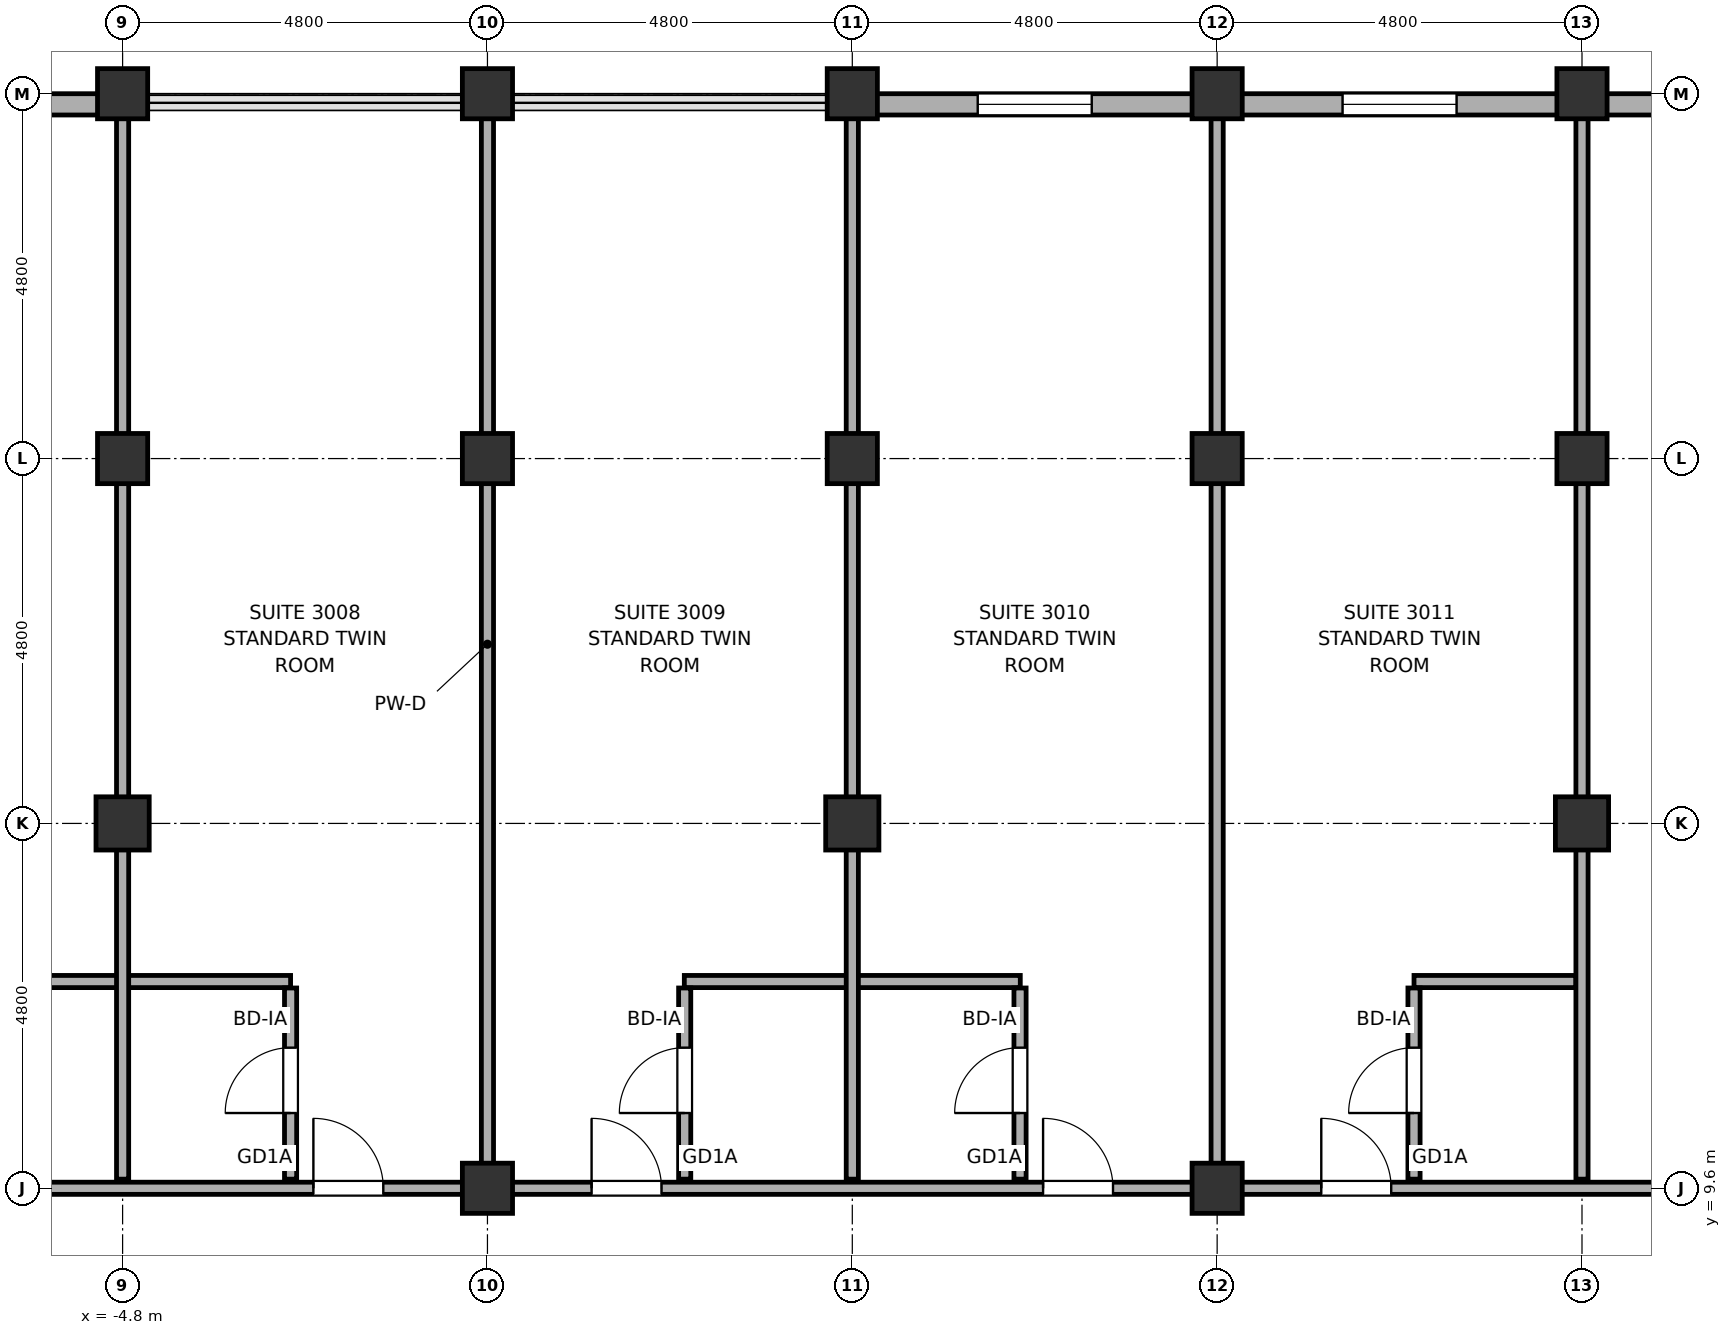
"""IFC4 building model, lengths in metres.
Left out: names, types, materials, properties, quantities, classifications, styles, units other than length and angle.
Written with IfcOpenShell. Run it as: python <this file> out.ifc"""

import sys

from ifc_helpers import new_model, si_unit, direction, frame, frame_2d, origin, origin_2d, place, context, subcontext, project, spatial, rectangle, hollow_rectangle, hollow_circle, extrude, element, fill, save


model = new_model("IFC4")
c1 = context("Model", 3, precision=1e-05, world=origin(), true_north=direction((0.0, 1.0)))
c2 = subcontext(c1, "Body", "Model", "MODEL_VIEW")
j1 = project(units=[si_unit("LENGTHUNIT", "METRE"), si_unit("PLANEANGLEUNIT", "RADIAN")], contexts=[c1])
p1 = place(None, origin())
s1 = spatial("IfcSite", under=j1, at=p1, CompositionType="ELEMENT")
p2 = place(p1, origin())
s2 = spatial("IfcBuilding", under=s1, at=p2, CompositionType="ELEMENT")
p3 = place(p2, frame((0.0, 0.0, 124.8)))
s3 = spatial("IfcBuildingStorey", under=s2, at=p3, CompositionType="ELEMENT", Elevation=124.8)
p4 = place(p3, frame((-4.8, 14.4, 0.0), z_axis=(0.0, 0.0, 1.0), x_axis=(1.0, 0.0, 0.0)))
e1 = element("IfcColumn", 1, at=p4, inside=s3, PredefinedType="COLUMN", context=c2, shape_type="SweptSolid", body=[
    extrude(hollow_rectangle(XDim=0.7, YDim=0.7, WallThickness=0.032, at=origin_2d()), origin(), (0.0, 0.0, 1.0), 3.7),
])
for number, where, z_axis, x_axis in (
    (2, (-4.8, 19.2, 0.0), (0.0, 0.0, 1.0), (1.0, 0.0, 0.0)),
    (3, (-4.8, 24.0, 0.0), (0.0, 0.0, 1.0), (1.0, 0.0, 0.0)),
    (4, (0.0, 9.6, 0.0), (0.0, 0.0, 1.0), (1.0, 0.0, 0.0)),
    (5, (0.0, 19.2, 0.0), (0.0, 0.0, 1.0), (1.0, 0.0, 0.0)),
    (6, (0.0, 24.0, 0.0), (0.0, 0.0, 1.0), (1.0, 0.0, 0.0)),
):
    element("IfcColumn", number, at=place(p3, frame(where, z_axis=z_axis, x_axis=x_axis)), inside=s3, PredefinedType="COLUMN", context=c2, shape_type="SweptSolid", body=[
        extrude(hollow_circle(Radius=0.33, WallThickness=0.028, at=origin_2d()), origin(), (0.0, 0.0, 1.0), 3.7),
    ])
p5 = place(p3, frame((4.8, 14.4, 0.0), z_axis=(0.0, 0.0, 1.0), x_axis=(1.0, 0.0, 0.0)))
e7 = element("IfcColumn", 7, at=p5, inside=s3, PredefinedType="COLUMN", context=c2, shape_type="SweptSolid", body=[
    extrude(hollow_rectangle(XDim=0.7, YDim=0.7, WallThickness=0.032, at=origin_2d()), origin(), (0.0, 0.0, 1.0), 3.7),
])
for number, where, z_axis, x_axis in (
    (8, (4.8, 19.2, 0.0), (0.0, 0.0, 1.0), (1.0, 0.0, 0.0)),
    (9, (4.8, 24.0, 0.0), (0.0, 0.0, 1.0), (1.0, 0.0, 0.0)),
    (10, (9.6, 9.6, 0.0), (0.0, 0.0, 1.0), (1.0, 0.0, 0.0)),
    (11, (9.6, 19.2, 0.0), (0.0, 0.0, 1.0), (1.0, 0.0, 0.0)),
    (12, (9.6, 24.0, 0.0), (0.0, 0.0, 1.0), (1.0, 0.0, 0.0)),
):
    element("IfcColumn", number, at=place(p3, frame(where, z_axis=z_axis, x_axis=x_axis)), inside=s3, PredefinedType="COLUMN", context=c2, shape_type="SweptSolid", body=[
        extrude(hollow_circle(Radius=0.33, WallThickness=0.028, at=origin_2d()), origin(), (0.0, 0.0, 1.0), 3.7),
    ])
p6 = place(p3, frame((14.4, 14.4, 0.0), z_axis=(0.0, 0.0, 1.0), x_axis=(1.0, 0.0, 0.0)))
e13 = element("IfcColumn", 13, at=p6, inside=s3, PredefinedType="COLUMN", context=c2, shape_type="SweptSolid", body=[
    extrude(hollow_rectangle(XDim=0.7, YDim=0.7, WallThickness=0.032, at=origin_2d()), origin(), (0.0, 0.0, 1.0), 3.7),
])
for number, where, z_axis, x_axis in (
    (14, (14.4, 19.2, 0.0), (0.0, 0.0, 1.0), (1.0, 0.0, 0.0)),
    (15, (14.4, 24.0, 0.0), (0.0, 0.0, 1.0), (1.0, 0.0, 0.0)),
):
    element("IfcColumn", number, at=place(p3, frame(where, z_axis=z_axis, x_axis=x_axis)), inside=s3, PredefinedType="COLUMN", context=c2, shape_type="SweptSolid", body=[
        extrude(hollow_circle(Radius=0.33, WallThickness=0.028, at=origin_2d()), origin(), (0.0, 0.0, 1.0), 3.7),
    ])
p7 = place(p3, frame((-30.0, 23.86, 0.0), z_axis=(0.0, 0.0, 1.0), x_axis=(1.0, 0.0, 0.0)))
e16 = element("IfcWall", 16, at=p7, inside=s3, PredefinedType="SOLIDWALL", context=c2, shape_type="SweptSolid", body=[
    extrude(rectangle(XDim=25.25, YDim=0.28, at=frame_2d((12.625, 0.0))), origin(), (0.0, 0.0, 1.0), 2.12),
])
p8 = place(p7, frame((7.65, 0.0, 0.75)))
e17 = element("IfcOpeningElement", 17, at=p8, cuts=e16, PredefinedType="OPENING", context=c2, shape_type="SweptSolid", body=[
    extrude(rectangle(XDim=1.5, YDim=1.15, at=frame_2d((0.75, 0.575))), frame((0.0, 0.155, 0.0), z_axis=(0.0, -1.0, 0.0), x_axis=(1.0, 0.0, 0.0)), (0.0, 0.0, 1.0), 0.31),
])
p9 = place(p7, frame((18.6, 0.0, 0.75)))
e18 = element("IfcOpeningElement", 18, at=p9, cuts=e16, PredefinedType="OPENING", context=c2, shape_type="SweptSolid", body=[
    extrude(rectangle(XDim=1.2, YDim=1.15, at=frame_2d((0.6, 0.575))), frame((0.0, 0.155, 0.0), z_axis=(0.0, -1.0, 0.0), x_axis=(1.0, 0.0, 0.0)), (0.0, 0.0, 1.0), 0.31),
])
p10 = place(p7, frame((22.05, 0.0, 0.75)))
e19 = element("IfcOpeningElement", 19, at=p10, cuts=e16, PredefinedType="OPENING", context=c2, shape_type="SweptSolid", body=[
    extrude(rectangle(XDim=1.5, YDim=1.15, at=frame_2d((0.75, 0.575))), frame((0.0, 0.155, 0.0), z_axis=(0.0, -1.0, 0.0), x_axis=(1.0, 0.0, 0.0)), (0.0, 0.0, 1.0), 0.31),
])
p11 = place(p3, frame((4.75, 23.86, 0.0), z_axis=(0.0, 0.0, 1.0), x_axis=(1.0, 0.0, 0.0)))
e20 = element("IfcWall", 20, at=p11, inside=s3, PredefinedType="SOLIDWALL", context=c2, shape_type="SweptSolid", body=[
    extrude(rectangle(XDim=20.45, YDim=0.28, at=frame_2d((10.225, 0.0))), origin(), (0.0, 0.0, 1.0), 2.12),
])
p12 = place(p11, frame((11.817, 0.0, 0.75)))
e21 = element("IfcOpeningElement", 21, at=p12, cuts=e20, PredefinedType="OPENING", context=c2, shape_type="SweptSolid", body=[
    extrude(rectangle(XDim=1.5, YDim=1.15, at=frame_2d((0.75, 0.575))), frame((0.0, 0.155, 0.0), z_axis=(0.0, -1.0, 0.0), x_axis=(1.0, 0.0, 0.0)), (0.0, 0.0, 1.0), 0.31),
])
p13 = place(p11, frame((1.7, 0.0, 0.75)))
e22 = element("IfcOpeningElement", 22, at=p13, cuts=e20, PredefinedType="OPENING", context=c2, shape_type="SweptSolid", body=[
    extrude(rectangle(XDim=1.5, YDim=1.15, at=frame_2d((0.75, 0.575))), frame((0.0, 0.155, 0.0), z_axis=(0.0, -1.0, 0.0), x_axis=(1.0, 0.0, 0.0)), (0.0, 0.0, 1.0), 0.31),
])
p14 = place(p11, frame((6.5, 0.0, 0.75)))
e23 = element("IfcOpeningElement", 23, at=p14, cuts=e20, PredefinedType="OPENING", context=c2, shape_type="SweptSolid", body=[
    extrude(rectangle(XDim=1.5, YDim=1.15, at=frame_2d((0.75, 0.575))), frame((0.0, 0.155, 0.0), z_axis=(0.0, -1.0, 0.0), x_axis=(1.0, 0.0, 0.0)), (0.0, 0.0, 1.0), 0.31),
])
p15 = place(p3, frame((-14.32, 9.6, 0.0), z_axis=(0.0, 0.0, 1.0), x_axis=(1.0, 0.0, 0.0)))
e24 = element("IfcWall", 24, at=p15, inside=s3, PredefinedType="PARTITIONING", context=c2, shape_type="SweptSolid", body=[
    extrude(rectangle(XDim=42.95, YDim=0.16, at=frame_2d((21.475, 0.0))), origin(), (0.0, 0.0, 1.0), 2.12),
])
p16 = place(p15, frame((35.47, 0.0, 0.0)))
e25 = element("IfcOpeningElement", 25, at=p16, cuts=e24, PredefinedType="OPENING", context=c2, shape_type="SweptSolid", body=[
    extrude(rectangle(XDim=0.9, YDim=2.02, at=frame_2d((0.45, 1.01))), frame((0.0, 0.095, 0.0), z_axis=(0.0, -1.0, 0.0), x_axis=(1.0, 0.0, 0.0)), (0.0, 0.0, 1.0), 0.19),
])
p17 = place(p15, frame((0.67, 0.0, 0.0)))
e26 = element("IfcOpeningElement", 26, at=p17, cuts=e24, PredefinedType="OPENING", context=c2, shape_type="SweptSolid", body=[
    extrude(rectangle(XDim=0.9, YDim=2.02, at=frame_2d((0.45, 1.01))), frame((0.0, 0.095, 0.0), z_axis=(0.0, -1.0, 0.0), x_axis=(1.0, 0.0, 0.0)), (0.0, 0.0, 1.0), 0.19),
])
p18 = place(p15, frame((2.56, 0.0, 0.0)))
e27 = element("IfcOpeningElement", 27, at=p18, cuts=e24, PredefinedType="OPENING", context=c2, shape_type="SweptSolid", body=[
    extrude(rectangle(XDim=0.9, YDim=2.02, at=frame_2d((0.45, 1.01))), frame((0.0, 0.095, 0.0), z_axis=(0.0, -1.0, 0.0), x_axis=(1.0, 0.0, 0.0)), (0.0, 0.0, 1.0), 0.19),
])
p19 = place(p15, frame((6.09, 0.0, 0.0)))
e28 = element("IfcOpeningElement", 28, at=p19, cuts=e24, PredefinedType="OPENING", context=c2, shape_type="SweptSolid", body=[
    extrude(rectangle(XDim=0.92, YDim=2.02, at=frame_2d((0.46, 1.01))), frame((0.0, 0.095, 0.0), z_axis=(0.0, -1.0, 0.0), x_axis=(1.0, 0.0, 0.0)), (0.0, 0.0, 1.0), 0.19),
])
p20 = place(p15, frame((12.03, 0.0, 0.0)))
e29 = element("IfcOpeningElement", 29, at=p20, cuts=e24, PredefinedType="OPENING", context=c2, shape_type="SweptSolid", body=[
    extrude(rectangle(XDim=0.92, YDim=2.02, at=frame_2d((0.46, 1.01))), frame((0.0, 0.095, 0.0), z_axis=(0.0, -1.0, 0.0), x_axis=(1.0, 0.0, 0.0)), (0.0, 0.0, 1.0), 0.19),
])
p21 = place(p15, frame((15.69, 0.0, 0.0)))
e30 = element("IfcOpeningElement", 30, at=p21, cuts=e24, PredefinedType="OPENING", context=c2, shape_type="SweptSolid", body=[
    extrude(rectangle(XDim=0.92, YDim=2.02, at=frame_2d((0.46, 1.01))), frame((0.0, 0.095, 0.0), z_axis=(0.0, -1.0, 0.0), x_axis=(1.0, 0.0, 0.0)), (0.0, 0.0, 1.0), 0.19),
])
p22 = place(p15, frame((21.63, 0.0, 0.0)))
e31 = element("IfcOpeningElement", 31, at=p22, cuts=e24, PredefinedType="OPENING", context=c2, shape_type="SweptSolid", body=[
    extrude(rectangle(XDim=0.92, YDim=2.02, at=frame_2d((0.46, 1.01))), frame((0.0, 0.095, 0.0), z_axis=(0.0, -1.0, 0.0), x_axis=(1.0, 0.0, 0.0)), (0.0, 0.0, 1.0), 0.19),
])
p23 = place(p15, frame((25.29, 0.0, 0.0)))
e32 = element("IfcOpeningElement", 32, at=p23, cuts=e24, PredefinedType="OPENING", context=c2, shape_type="SweptSolid", body=[
    extrude(rectangle(XDim=0.92, YDim=2.02, at=frame_2d((0.46, 1.01))), frame((0.0, 0.095, 0.0), z_axis=(0.0, -1.0, 0.0), x_axis=(1.0, 0.0, 0.0)), (0.0, 0.0, 1.0), 0.19),
])
for number, where, z_axis, x_axis in (
    (33, (-7.01, 12.32, 0.0), (0.0, 0.0, 1.0), (1.0, 0.0, 0.0)),
    (34, (2.59, 12.32, 0.0), (0.0, 0.0, 1.0), (1.0, 0.0, 0.0)),
):
    element("IfcWall", number, at=place(p3, frame(where, z_axis=z_axis, x_axis=x_axis)), inside=s3, PredefinedType="PARTITIONING", context=c2, shape_type="SweptSolid", body=[
        extrude(rectangle(XDim=4.42, YDim=0.16, at=frame_2d((2.21, 0.0))), origin(), (0.0, 0.0, 1.0), 2.87),
    ])
p24 = place(p3, frame((12.19, 12.32, 0.0), z_axis=(0.0, 0.0, 1.0), x_axis=(1.0, 0.0, 0.0)))
e35 = element("IfcWall", 35, at=p24, inside=s3, PredefinedType="PARTITIONING", context=c2, shape_type="SweptSolid", body=[
    extrude(rectangle(XDim=2.13, YDim=0.16, at=frame_2d((1.065, 0.0))), origin(), (0.0, 0.0, 1.0), 2.87),
])
p25 = place(p3, frame((-4.8, 9.72, 0.0), z_axis=(0.0, 0.0, 1.0), x_axis=(0.0, 1.0, 0.0)))
e36 = element("IfcWall", 36, at=p25, inside=s3, PredefinedType="PARTITIONING", context=c2, shape_type="SweptSolid", body=[
    extrude(rectangle(XDim=13.99, YDim=0.16, at=frame_2d((6.995, 0.0))), origin(), (0.0, 0.0, 1.0), 2.12),
])
p26 = place(p3, frame((-2.59, 9.72, 0.0), z_axis=(0.0, 0.0, 1.0), x_axis=(0.0, 1.0, 0.0)))
e37 = element("IfcWall", 37, at=p26, inside=s3, PredefinedType="PARTITIONING", context=c2, shape_type="SweptSolid", body=[
    extrude(rectangle(XDim=2.515, YDim=0.16, at=frame_2d((1.258, 0.0))), origin(), (0.0, 0.0, 1.0), 2.12),
])
p27 = place(p26, frame((0.87, 0.0, 0.0)))
e38 = element("IfcOpeningElement", 38, at=p27, cuts=e37, PredefinedType="OPENING", context=c2, shape_type="SweptSolid", body=[
    extrude(rectangle(XDim=0.86, YDim=2.02, at=frame_2d((0.43, 1.01))), frame((0.0, 0.095, 0.0), z_axis=(0.0, -1.0, 0.0), x_axis=(1.0, 0.0, 0.0)), (0.0, 0.0, 1.0), 0.19),
])
p28 = place(p3, frame((0.0, 9.72, 0.0), z_axis=(0.0, 0.0, 1.0), x_axis=(0.0, 1.0, 0.0)))
e39 = element("IfcWall", 39, at=p28, inside=s3, PredefinedType="PARTITIONING", context=c2, shape_type="SweptSolid", body=[
    extrude(rectangle(XDim=14.075, YDim=0.16, at=frame_2d((7.038, 0.0))), origin(), (0.0, 0.0, 1.0), 2.12),
])
p29 = place(p3, frame((2.595, 9.72, 0.0), z_axis=(0.0, 0.0, 1.0), x_axis=(0.0, 1.0, 0.0)))
e40 = element("IfcWall", 40, at=p29, inside=s3, PredefinedType="PARTITIONING", context=c2, shape_type="SweptSolid", body=[
    extrude(rectangle(XDim=2.515, YDim=0.16, at=frame_2d((1.258, 0.0))), origin(), (0.0, 0.0, 1.0), 2.12),
])
p30 = place(p29, frame((0.87, 0.0, 0.0)))
e41 = element("IfcOpeningElement", 41, at=p30, cuts=e40, PredefinedType="OPENING", context=c2, shape_type="SweptSolid", body=[
    extrude(rectangle(XDim=0.86, YDim=2.02, at=frame_2d((0.43, 1.01))), frame((0.0, 0.095, 0.0), z_axis=(0.0, -1.0, 0.0), x_axis=(1.0, 0.0, 0.0)), (0.0, 0.0, 1.0), 0.19),
])
p31 = place(p3, frame((4.8, 9.72, 0.0), z_axis=(0.0, 0.0, 1.0), x_axis=(0.0, 1.0, 0.0)))
e42 = element("IfcWall", 42, at=p31, inside=s3, PredefinedType="PARTITIONING", context=c2, shape_type="SweptSolid", body=[
    extrude(rectangle(XDim=13.99, YDim=0.16, at=frame_2d((6.995, 0.0))), origin(), (0.0, 0.0, 1.0), 2.12),
])
p32 = place(p3, frame((7.007, 9.72, 0.0), z_axis=(0.0, 0.0, 1.0), x_axis=(0.0, 1.0, 0.0)))
e43 = element("IfcWall", 43, at=p32, inside=s3, PredefinedType="PARTITIONING", context=c2, shape_type="SweptSolid", body=[
    extrude(rectangle(XDim=2.515, YDim=0.16, at=frame_2d((1.258, 0.0))), origin(), (0.0, 0.0, 1.0), 2.12),
])
p33 = place(p32, frame((0.87, 0.0, 0.0)))
e44 = element("IfcOpeningElement", 44, at=p33, cuts=e43, PredefinedType="OPENING", context=c2, shape_type="SweptSolid", body=[
    extrude(rectangle(XDim=0.86, YDim=2.02, at=frame_2d((0.43, 1.01))), frame((0.0, 0.095, 0.0), z_axis=(0.0, -1.0, 0.0), x_axis=(1.0, 0.0, 0.0)), (0.0, 0.0, 1.0), 0.19),
])
p34 = place(p3, frame((9.6, 9.72, 0.0), z_axis=(0.0, 0.0, 1.0), x_axis=(0.0, 1.0, 0.0)))
e45 = element("IfcWall", 45, at=p34, inside=s3, PredefinedType="PARTITIONING", context=c2, shape_type="SweptSolid", body=[
    extrude(rectangle(XDim=13.99, YDim=0.16, at=frame_2d((6.995, 0.0))), origin(), (0.0, 0.0, 1.0), 2.12),
])
p35 = place(p3, frame((12.19, 9.72, 0.0), z_axis=(0.0, 0.0, 1.0), x_axis=(0.0, 1.0, 0.0)))
e46 = element("IfcWall", 46, at=p35, inside=s3, PredefinedType="PARTITIONING", context=c2, shape_type="SweptSolid", body=[
    extrude(rectangle(XDim=2.515, YDim=0.16, at=frame_2d((1.258, 0.0))), origin(), (0.0, 0.0, 1.0), 2.12),
])
p36 = place(p35, frame((0.87, 0.0, 0.0)))
e47 = element("IfcOpeningElement", 47, at=p36, cuts=e46, PredefinedType="OPENING", context=c2, shape_type="SweptSolid", body=[
    extrude(rectangle(XDim=0.86, YDim=2.02, at=frame_2d((0.43, 1.01))), frame((0.0, 0.095, 0.0), z_axis=(0.0, -1.0, 0.0), x_axis=(1.0, 0.0, 0.0)), (0.0, 0.0, 1.0), 0.19),
])
p37 = place(p3, frame((14.4, 9.72, 0.0), z_axis=(0.0, 0.0, 1.0), x_axis=(0.0, 1.0, 0.0)))
e48 = element("IfcWall", 48, at=p37, inside=s3, PredefinedType="PARTITIONING", context=c2, shape_type="SweptSolid", body=[
    extrude(rectangle(XDim=13.99, YDim=0.16, at=frame_2d((6.995, 0.0))), origin(), (0.0, 0.0, 1.0), 2.12),
])
p38 = place(p13, origin())
e49 = element("IfcWindow", 49, at=p38, inside=s3, PartitioningType="SINGLE_PANEL", PredefinedType="WINDOW", context=c2, shape_type="SweptSolid", body=[
    extrude(rectangle(XDim=1.5, YDim=1.15, at=frame_2d((0.75, 0.575))), frame((0.0, 0.03, 0.0), z_axis=(0.0, -1.0, 0.0), x_axis=(1.0, 0.0, 0.0)), (0.0, 0.0, 1.0), 0.06),
])
fill(e22, e49)
p39 = place(p14, origin())
e50 = element("IfcWindow", 50, at=p39, inside=s3, PartitioningType="SINGLE_PANEL", PredefinedType="WINDOW", context=c2, shape_type="SweptSolid", body=[
    extrude(rectangle(XDim=1.5, YDim=1.15, at=frame_2d((0.75, 0.575))), frame((0.0, 0.03, 0.0), z_axis=(0.0, -1.0, 0.0), x_axis=(1.0, 0.0, 0.0)), (0.0, 0.0, 1.0), 0.06),
])
fill(e23, e50)
p40 = place(p20, origin())
e51 = element("IfcDoor", 51, at=p40, inside=s3, OperationType="SINGLE_SWING_RIGHT", PredefinedType="DOOR", context=c2, shape_type="SweptSolid", body=[
    extrude(rectangle(XDim=0.92, YDim=2.02, at=frame_2d((0.46, 1.01))), frame((0.0, 0.025, 0.0), z_axis=(0.0, -1.0, 0.0), x_axis=(1.0, 0.0, 0.0)), (0.0, 0.0, 1.0), 0.05),
])
fill(e29, e51)
p41 = place(p27, origin())
e52 = element("IfcDoor", 52, at=p41, inside=s3, OperationType="SINGLE_SWING_LEFT", PredefinedType="DOOR", context=c2, shape_type="SweptSolid", body=[
    extrude(rectangle(XDim=0.86, YDim=2.02, at=frame_2d((0.43, 1.01))), frame((0.0, 0.025, 0.0), z_axis=(0.0, -1.0, 0.0), x_axis=(1.0, 0.0, 0.0)), (0.0, 0.0, 1.0), 0.05),
])
fill(e38, e52)
p42 = place(p21, origin())
e53 = element("IfcDoor", 53, at=p42, inside=s3, OperationType="SINGLE_SWING_LEFT", PredefinedType="DOOR", context=c2, shape_type="SweptSolid", body=[
    extrude(rectangle(XDim=0.92, YDim=2.02, at=frame_2d((0.46, 1.01))), frame((0.0, 0.025, 0.0), z_axis=(0.0, -1.0, 0.0), x_axis=(1.0, 0.0, 0.0)), (0.0, 0.0, 1.0), 0.05),
])
fill(e30, e53)
p43 = place(p30, origin())
e54 = element("IfcDoor", 54, at=p43, inside=s3, OperationType="SINGLE_SWING_RIGHT", PredefinedType="DOOR", context=c2, shape_type="SweptSolid", body=[
    extrude(rectangle(XDim=0.86, YDim=2.02, at=frame_2d((0.43, 1.01))), frame((0.0, 0.025, 0.0), z_axis=(0.0, -1.0, 0.0), x_axis=(1.0, 0.0, 0.0)), (0.0, 0.0, 1.0), 0.05),
])
fill(e41, e54)
p44 = place(p22, origin())
e55 = element("IfcDoor", 55, at=p44, inside=s3, OperationType="SINGLE_SWING_RIGHT", PredefinedType="DOOR", context=c2, shape_type="SweptSolid", body=[
    extrude(rectangle(XDim=0.92, YDim=2.02, at=frame_2d((0.46, 1.01))), frame((0.0, 0.025, 0.0), z_axis=(0.0, -1.0, 0.0), x_axis=(1.0, 0.0, 0.0)), (0.0, 0.0, 1.0), 0.05),
])
fill(e31, e55)
p45 = place(p33, origin())
e56 = element("IfcDoor", 56, at=p45, inside=s3, OperationType="SINGLE_SWING_LEFT", PredefinedType="DOOR", context=c2, shape_type="SweptSolid", body=[
    extrude(rectangle(XDim=0.86, YDim=2.02, at=frame_2d((0.43, 1.01))), frame((0.0, 0.025, 0.0), z_axis=(0.0, -1.0, 0.0), x_axis=(1.0, 0.0, 0.0)), (0.0, 0.0, 1.0), 0.05),
])
fill(e44, e56)
p46 = place(p23, origin())
e57 = element("IfcDoor", 57, at=p46, inside=s3, OperationType="SINGLE_SWING_RIGHT", PredefinedType="DOOR", context=c2, shape_type="SweptSolid", body=[
    extrude(rectangle(XDim=0.92, YDim=2.02, at=frame_2d((0.46, 1.01))), frame((0.0, 0.025, 0.0), z_axis=(0.0, -1.0, 0.0), x_axis=(1.0, 0.0, 0.0)), (0.0, 0.0, 1.0), 0.05),
])
fill(e32, e57)
p47 = place(p36, origin())
e58 = element("IfcDoor", 58, at=p47, inside=s3, OperationType="SINGLE_SWING_RIGHT", PredefinedType="DOOR", context=c2, shape_type="SweptSolid", body=[
    extrude(rectangle(XDim=0.86, YDim=2.02, at=frame_2d((0.43, 1.01))), frame((0.0, 0.025, 0.0), z_axis=(0.0, -1.0, 0.0), x_axis=(1.0, 0.0, 0.0)), (0.0, 0.0, 1.0), 0.05),
])
fill(e47, e58)
save(model, sys.argv[1])
